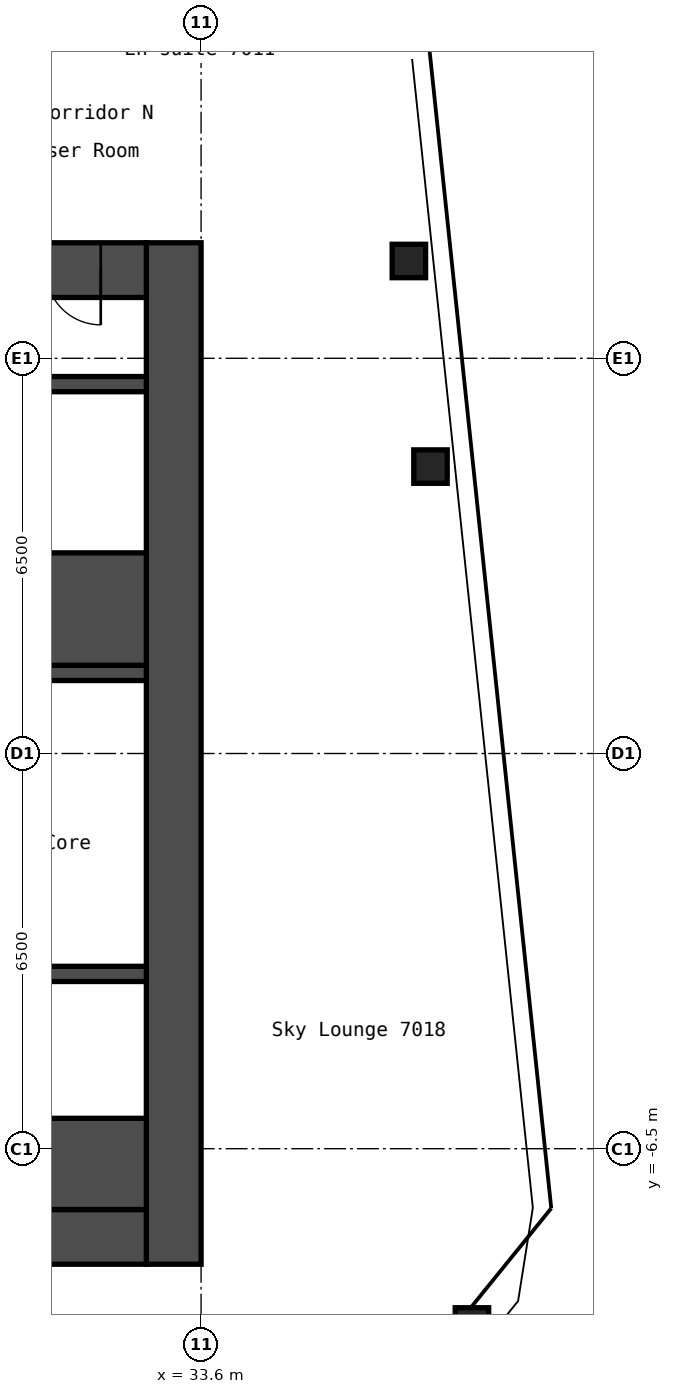
"""IFC4 building model, lengths in metres.
Left out: names, types, materials, properties, quantities, classifications, styles, units other than length and angle.
Written with IfcOpenShell. Run it as: python <this file> out.ifc"""

import sys

from ifc_helpers import new_model, si_unit, direction, frame, frame_2d, origin, origin_2d, place, context, subcontext, project, spatial, rectangle, hollow_rectangle, extrude, element, fill, save


model = new_model("IFC4")
c1 = context("Model", 3, precision=1e-05, world=origin(), true_north=direction((0.0, 1.0)))
c2 = subcontext(c1, "Body", "Model", "MODEL_VIEW")
j1 = project(units=[si_unit("LENGTHUNIT", "METRE"), si_unit("PLANEANGLEUNIT", "RADIAN")], contexts=[c1])
p1 = place(None, origin())
s1 = spatial("IfcSite", under=j1, at=p1, CompositionType="ELEMENT")
p2 = place(p1, origin())
s2 = spatial("IfcBuilding", under=s1, at=p2, CompositionType="ELEMENT")
p3 = place(p2, frame((0.0, 0.0, 248.6)))
s3 = spatial("IfcBuildingStorey", under=s2, at=p3, CompositionType="ELEMENT", Elevation=248.6)
for number, where, z_axis, x_axis in (
    (1, (38.054, -9.39, 0.0), (0.0, 0.0, 1.0), (1.0, 0.0, 0.0)),
    (2, (37.373, 4.719, 0.0), (0.0, 0.0, 1.0), (1.0, 0.0, 0.0)),
    (3, (37.017, 8.1, 0.0), (0.0, 0.0, 1.0), (1.0, 0.0, 0.0)),
):
    element("IfcColumn", number, at=place(p3, frame(where, z_axis=z_axis, x_axis=x_axis)), inside=s3, PredefinedType="COLUMN", context=c2, shape_type="SweptSolid", body=[
        extrude(hollow_rectangle(XDim=0.55, YDim=0.55, WallThickness=0.022, InnerFilletRadius=0.033, OuterFilletRadius=0.055, at=origin_2d()), origin(), (0.0, 0.0, 1.0), 2.75),
    ])
p4 = place(p3, frame((33.15, -8.4, 0.0), z_axis=(0.0, 0.0, 1.0), x_axis=(0.0, 1.0, 0.0)))
e4 = element("IfcWall", 4, at=p4, inside=s3, PredefinedType="SHEAR", context=c2, shape_type="SweptSolid", body=[
    extrude(rectangle(XDim=16.8, YDim=0.9, at=frame_2d((8.4, 0.0))), origin(), (0.0, 0.0, 1.0), 2.75),
])
p5 = place(p3, frame((17.7, 7.95, 0.0), z_axis=(0.0, 0.0, 1.0), x_axis=(1.0, 0.0, 0.0)))
e5 = element("IfcWall", 5, at=p5, inside=s3, PredefinedType="SHEAR", context=c2, shape_type="SweptSolid", body=[
    extrude(rectangle(XDim=15.0, YDim=0.9, at=frame_2d((7.5, 0.0))), origin(), (0.0, 0.0, 1.0), 2.75),
])
p6 = place(p5, frame((10.4, 0.0, 0.0)))
e6 = element("IfcOpeningElement", 6, at=p6, cuts=e5, PredefinedType="OPENING", context=c2, shape_type="SweptSolid", body=[
    extrude(rectangle(XDim=1.2, YDim=2.1, at=frame_2d((0.6, 1.05))), frame((0.0, 0.46, 0.0), z_axis=(0.0, -1.0, 0.0), x_axis=(1.0, 0.0, 0.0)), (0.0, 0.0, 1.0), 0.92),
])
p7 = place(p5, frame((13.35, 0.0, 0.0)))
e7 = element("IfcOpeningElement", 7, at=p7, cuts=e5, PredefinedType="OPENING", context=c2, shape_type="SweptSolid", body=[
    extrude(rectangle(XDim=0.9, YDim=2.1, at=frame_2d((0.45, 1.05))), frame((0.0, 0.46, 0.0), z_axis=(0.0, -1.0, 0.0), x_axis=(1.0, 0.0, 0.0)), (0.0, 0.0, 1.0), 0.92),
])
p8 = place(p3, frame((17.7, -7.95, 0.0), z_axis=(0.0, 0.0, 1.0), x_axis=(1.0, 0.0, 0.0)))
e8 = element("IfcWall", 8, at=p8, inside=s3, PredefinedType="SHEAR", context=c2, shape_type="SweptSolid", body=[
    extrude(rectangle(XDim=15.0, YDim=0.9, at=frame_2d((7.5, 0.0))), origin(), (0.0, 0.0, 1.0), 2.75),
])
p9 = place(p8, frame((2.55, 0.0, 0.0)))
e9 = element("IfcOpeningElement", 9, at=p9, cuts=e8, PredefinedType="OPENING", context=c2, shape_type="SweptSolid", body=[
    extrude(rectangle(XDim=1.0, YDim=2.1, at=frame_2d((0.5, 1.05))), frame((0.0, 0.46, 0.0), z_axis=(0.0, -1.0, 0.0), x_axis=(1.0, 0.0, 0.0)), (0.0, 0.0, 1.0), 0.92),
])
p10 = place(p3, frame((27.65, 1.325, 0.0), z_axis=(0.0, 0.0, 1.0), x_axis=(1.0, 0.0, 0.0)))
e10 = element("IfcWall", 10, at=p10, inside=s3, PredefinedType="SHEAR", context=c2, shape_type="SweptSolid", body=[
    extrude(rectangle(XDim=5.05, YDim=0.25, at=frame_2d((2.525, 0.0))), origin(), (0.0, 0.0, 1.0), 2.75),
])
p11 = place(p10, frame((0.55, 0.0, 0.0)))
e11 = element("IfcOpeningElement", 11, at=p11, cuts=e10, PredefinedType="OPENING", context=c2, shape_type="SweptSolid", body=[
    extrude(rectangle(XDim=1.2, YDim=2.1, at=frame_2d((0.6, 1.05))), frame((0.0, 0.135, 0.0), z_axis=(0.0, -1.0, 0.0), x_axis=(1.0, 0.0, 0.0)), (0.0, 0.0, 1.0), 0.27),
])
p12 = place(p3, frame((30.3, 2.375, 0.0), z_axis=(0.0, 0.0, 1.0), x_axis=(1.0, 0.0, 0.0)))
e12 = element("IfcWall", 12, at=p12, inside=s3, PredefinedType="SHEAR", context=c2, shape_type="SweptSolid", body=[
    extrude(rectangle(XDim=2.4, YDim=1.85, at=frame_2d((1.2, 0.0))), origin(), (0.0, 0.0, 1.0), 2.75),
])
p13 = place(p3, frame((30.3, 6.075, 0.0), z_axis=(0.0, 0.0, 1.0), x_axis=(1.0, 0.0, 0.0)))
e13 = element("IfcWall", 13, at=p13, inside=s3, PredefinedType="SHEAR", context=c2, shape_type="SweptSolid", body=[
    extrude(rectangle(XDim=2.4, YDim=0.25, at=frame_2d((1.2, 0.0))), origin(), (0.0, 0.0, 1.0), 2.75),
])
p14 = place(p3, frame((28.15, -3.625, 0.0), z_axis=(0.0, 0.0, 1.0), x_axis=(1.0, 0.0, 0.0)))
e14 = element("IfcWall", 14, at=p14, inside=s3, PredefinedType="SHEAR", context=c2, shape_type="SweptSolid", body=[
    extrude(rectangle(XDim=4.55, YDim=0.25, at=frame_2d((2.275, 0.0))), origin(), (0.0, 0.0, 1.0), 2.75),
])
p15 = place(p3, frame((28.15, -6.75, 0.0), z_axis=(0.0, 0.0, 1.0), x_axis=(1.0, 0.0, 0.0)))
e15 = element("IfcWall", 15, at=p15, inside=s3, PredefinedType="SHEAR", context=c2, shape_type="SweptSolid", body=[
    extrude(rectangle(XDim=4.55, YDim=1.5, at=frame_2d((2.275, 0.0))), origin(), (0.0, 0.0, 1.0), 2.75),
])
p16 = place(p3, frame((16.048, 10.533, 0.0), z_axis=(0.0, 0.0, 1.0), x_axis=(0.994522460242, 0.104523088709, 0.0)))
e16 = element("IfcWall", 16, at=p16, inside=s3, PredefinedType="PARTITIONING", context=c2, shape_type="SweptSolid", body=[
    extrude(rectangle(XDim=21.3, YDim=0.2, at=frame_2d((10.65, 0.0))), origin(), (0.0, 0.0, 1.0), 2.75),
])
p17 = place(p16, frame((3.4, 0.0, 0.0)))
e17 = element("IfcOpeningElement", 17, at=p17, cuts=e16, PredefinedType="OPENING", context=c2, shape_type="SweptSolid", body=[
    extrude(rectangle(XDim=1.6, YDim=2.1, at=frame_2d((0.8, 1.05))), frame((0.0, 0.11, 0.0), z_axis=(0.0, -1.0, 0.0), x_axis=(1.0, 0.0, 0.0)), (0.0, 0.0, 1.0), 0.22),
])
p18 = place(p16, frame((11.8, 0.0, 0.0)))
e18 = element("IfcOpeningElement", 18, at=p18, cuts=e16, PredefinedType="OPENING", context=c2, shape_type="SweptSolid", body=[
    extrude(rectangle(XDim=1.6, YDim=2.1, at=frame_2d((0.8, 1.05))), frame((0.0, 0.11, 0.0), z_axis=(0.0, -1.0, 0.0), x_axis=(1.0, 0.0, 0.0)), (0.0, 0.0, 1.0), 0.22),
])
p19 = place(p16, frame((19.65, 0.0, 0.0)))
e19 = element("IfcOpeningElement", 19, at=p19, cuts=e16, PredefinedType="OPENING", context=c2, shape_type="SweptSolid", body=[
    extrude(rectangle(XDim=1.0, YDim=2.1, at=frame_2d((0.5, 1.05))), frame((0.0, 0.11, 0.0), z_axis=(0.0, -1.0, 0.0), x_axis=(1.0, 0.0, 0.0)), (0.0, 0.0, 1.0), 0.22),
])
p20 = place(p7, origin())
e20 = element("IfcDoor", 20, at=p20, inside=s3, OperationType="SINGLE_SWING_RIGHT", PredefinedType="DOOR", context=c2, shape_type="SweptSolid", body=[
    extrude(rectangle(XDim=0.9, YDim=2.1, at=frame_2d((0.45, 1.05))), frame((0.0, 0.025, 0.0), z_axis=(0.0, -1.0, 0.0), x_axis=(1.0, 0.0, 0.0)), (0.0, 0.0, 1.0), 0.05),
])
fill(e7, e20)
save(model, sys.argv[1])
